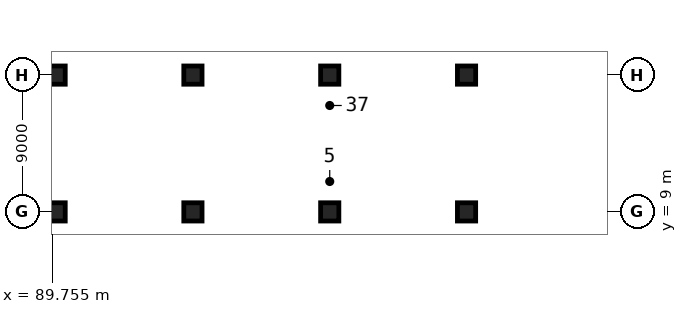
"""IFC4 building model, lengths in metres.
Left out: names, types, materials, properties, quantities, classifications, styles, units other than length and angle.
Written with IfcOpenShell. Run it as: python <this file> out.ifc"""

import sys

from ifc_helpers import new_model, si_unit, direction, frame, origin, origin_2d, place, context, subcontext, project, spatial, rectangle, extrude, element, save


model = new_model("IFC4")
c1 = context("Model", 3, precision=1e-05, world=origin(), true_north=direction((0.0, 1.0)))
c2 = subcontext(c1, "Body", "Model", "MODEL_VIEW")
j1 = project(units=[si_unit("LENGTHUNIT", "METRE"), si_unit("PLANEANGLEUNIT", "RADIAN")], contexts=[c1])
p1 = place(None, origin())
s1 = spatial("IfcSite", under=j1, at=p1, CompositionType="ELEMENT")
p2 = place(p1, origin())
s2 = spatial("IfcBuilding", under=s1, at=p2, CompositionType="ELEMENT")
p3 = place(p2, frame((0.0, 0.0, -4.5)))
s3 = spatial("IfcBuildingStorey", under=s2, at=p3, CompositionType="ELEMENT", Elevation=-4.5)
for number, where, z_axis, x_axis in (
    (1, (90.0, 9.0, 0.0), (0.0, 0.0, 1.0), (1.0, 0.0, 0.0)),
    (2, (90.0, 18.0, 0.0), (0.0, 0.0, 1.0), (1.0, 0.0, 0.0)),
    (3, (99.0, 9.0, 0.0), (0.0, 0.0, 1.0), (1.0, 0.0, 0.0)),
    (4, (99.0, 18.0, 0.0), (0.0, 0.0, 1.0), (1.0, 0.0, 0.0)),
    (5, (108.0, 9.0, 0.0), (0.0, 0.0, 1.0), (1.0, 0.0, 0.0)),
    (6, (108.0, 18.0, 0.0), (0.0, 0.0, 1.0), (1.0, 0.0, 0.0)),
    (7, (117.0, 9.0, 0.0), (0.0, 0.0, 1.0), (1.0, 0.0, 0.0)),
    (8, (117.0, 18.0, 0.0), (0.0, 0.0, 1.0), (1.0, 0.0, 0.0)),
):
    element("IfcColumn", number, at=place(p3, frame(where, z_axis=z_axis, x_axis=x_axis)), inside=s3, PredefinedType="COLUMN", context=c2, shape_type="SweptSolid", body=[
        extrude(rectangle(XDim=1.2, YDim=1.2, at=origin_2d()), origin(), (0.0, 0.0, 1.0), 4.5),
    ])
save(model, sys.argv[1])
